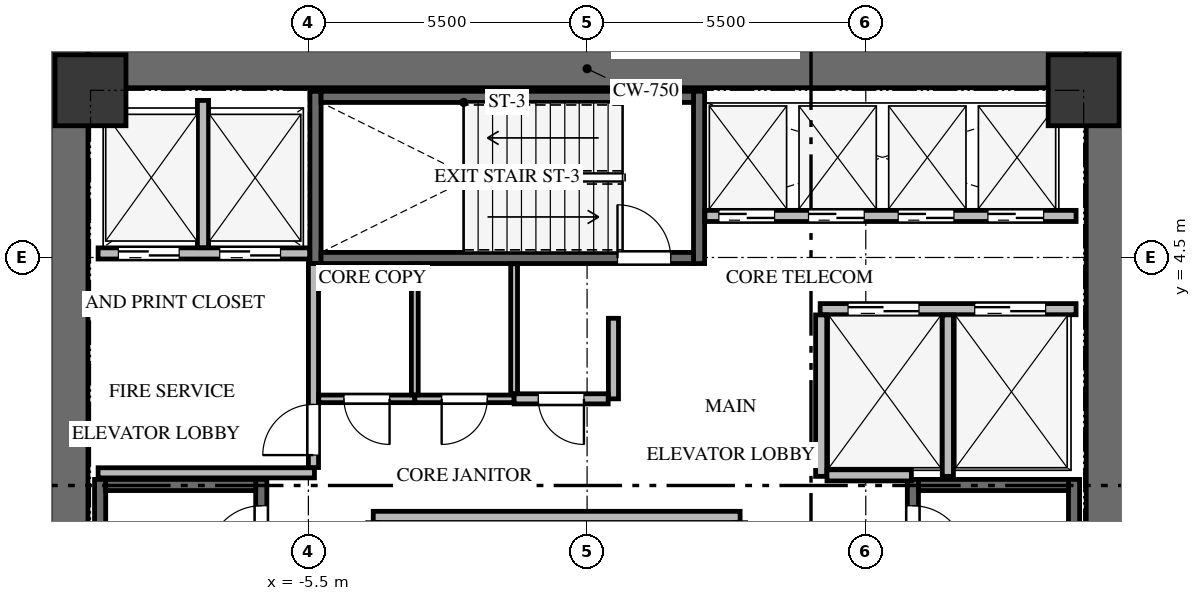
"""IFC4 building model, lengths in metres.
Left out: names, types, materials, properties, quantities, classifications, styles, units other than length and angle.
Written with IfcOpenShell. Run it as: python <this file> out.ifc"""

import sys

from ifc_helpers import new_model, si_unit, direction, frame, frame_2d, origin, origin_2d, place, context, subcontext, project, spatial, rectangle, extrude, source, transform, mapped, element, fill, save


model = new_model("IFC4")
c1 = context("Model", 3, precision=1e-05, world=origin(), true_north=direction((0.0, 1.0)))
c2 = subcontext(c1, "Body", "Model", "MODEL_VIEW")
j1 = project(units=[si_unit("LENGTHUNIT", "METRE"), si_unit("PLANEANGLEUNIT", "RADIAN")], contexts=[c1])
p1 = place(None, origin())
s1 = spatial("IfcSite", under=j1, at=p1, CompositionType="ELEMENT")
p2 = place(p1, origin())
s2 = spatial("IfcBuilding", under=s1, at=p2, CompositionType="ELEMENT")
p3 = place(p2, frame((0.0, 0.0, 93.3)))
s3 = spatial("IfcBuildingStorey", under=s2, at=p3, CompositionType="ELEMENT", Elevation=93.3)
for number, where, z_axis, x_axis in (
    (1, (-10.225, -8.6, 0.0), (0.0, 0.0, 1.0), (0.0, 1.0, 0.0)),
    (2, (10.225, -8.6, 0.0), (0.0, 0.0, 1.0), (0.0, 1.0, 0.0)),
):
    element("IfcWall", number, at=place(p3, frame(where, z_axis=z_axis, x_axis=x_axis)), inside=s3, PredefinedType="SHEAR", context=c2, shape_type="SweptSolid", body=[
        extrude(rectangle(XDim=17.2, YDim=0.75, at=frame_2d((8.6, 0.0))), origin(), (0.0, 0.0, 1.0), 4.2),
    ])
p4 = place(p3, frame((-9.85, 8.225, 0.0), z_axis=(0.0, 0.0, 1.0), x_axis=(1.0, 0.0, 0.0)))
e3 = element("IfcWall", 3, at=p4, inside=s3, PredefinedType="SHEAR", context=c2, shape_type="SweptSolid", body=[
    extrude(rectangle(XDim=19.7, YDim=0.75, at=frame_2d((9.85, 0.0))), origin(), (0.0, 0.0, 1.0), 4.2),
])
p5 = place(p3, frame((-6.43, -7.77, -0.3), z_axis=(0.0, 0.0, 1.0), x_axis=(0.0, 1.0, 0.0)))
e4 = element("IfcWall", 4, at=p5, inside=s3, PredefinedType="SHEAR", context=c2, shape_type="SweptSolid", body=[
    extrude(rectangle(XDim=7.89, YDim=0.22, at=frame_2d((3.945, 0.0))), origin(), (0.0, 0.0, 1.0), 4.26),
])
p6 = place(p5, frame((6.32, 0.0, 0.0)))
e5 = element("IfcOpeningElement", 5, at=p6, cuts=e4, PredefinedType="OPENING", context=c2, shape_type="SweptSolid", body=[
    extrude(rectangle(XDim=1.05, YDim=2.15, at=frame_2d((0.525, 1.075))), frame((0.0, 0.12, 0.0), z_axis=(0.0, -1.0, 0.0), x_axis=(1.0, 0.0, 0.0)), (0.0, 0.0, 1.0), 0.24),
])
p7 = place(p3, frame((-9.61, 0.12, -0.3), z_axis=(0.0, 0.0, 1.0), x_axis=(0.0, -1.0, 0.0)))
e6 = element("IfcWall", 6, at=p7, inside=s3, PredefinedType="SHEAR", context=c2, shape_type="SweptSolid", body=[
    extrude(rectangle(XDim=7.89, YDim=0.22, at=frame_2d((3.945, 0.0))), origin(), (0.0, 0.0, 1.0), 4.26),
])
p8 = place(p3, frame((-6.54, 0.01, -0.3), z_axis=(0.0, 0.0, 1.0), x_axis=(-1.0, 0.0, 0.0)))
e7 = element("IfcWall", 7, at=p8, inside=s3, PredefinedType="SHEAR", context=c2, shape_type="SweptSolid", body=[
    extrude(rectangle(XDim=2.96, YDim=0.22, at=frame_2d((1.48, 0.0))), origin(), (0.0, 0.0, 1.0), 4.26),
])
p9 = place(p3, frame((9.61, -7.77, -0.3), z_axis=(0.0, 0.0, 1.0), x_axis=(0.0, 1.0, 0.0)))
e8 = element("IfcWall", 8, at=p9, inside=s3, PredefinedType="SHEAR", context=c2, shape_type="SweptSolid", body=[
    extrude(rectangle(XDim=7.89, YDim=0.22, at=frame_2d((3.945, 0.0))), origin(), (0.0, 0.0, 1.0), 4.26),
])
p10 = place(p3, frame((6.43, 0.12, -0.3), z_axis=(0.0, 0.0, 1.0), x_axis=(0.0, -1.0, 0.0)))
e9 = element("IfcWall", 9, at=p10, inside=s3, PredefinedType="SHEAR", context=c2, shape_type="SweptSolid", body=[
    extrude(rectangle(XDim=7.89, YDim=0.22, at=frame_2d((3.945, 0.0))), origin(), (0.0, 0.0, 1.0), 4.26),
])
p11 = place(p10, frame((0.52, 0.0, 0.0)))
e10 = element("IfcOpeningElement", 10, at=p11, cuts=e9, PredefinedType="OPENING", context=c2, shape_type="SweptSolid", body=[
    extrude(rectangle(XDim=1.05, YDim=2.15, at=frame_2d((0.525, 1.075))), frame((0.0, 0.12, 0.0), z_axis=(0.0, -1.0, 0.0), x_axis=(1.0, 0.0, 0.0)), (0.0, 0.0, 1.0), 0.24),
])
p12 = place(p3, frame((9.5, 0.01, -0.3), z_axis=(0.0, 0.0, 1.0), x_axis=(-1.0, 0.0, 0.0)))
e11 = element("IfcWall", 11, at=p12, inside=s3, PredefinedType="SHEAR", context=c2, shape_type="SweptSolid", body=[
    extrude(rectangle(XDim=2.96, YDim=0.22, at=frame_2d((1.48, 0.0))), origin(), (0.0, 0.0, 1.0), 4.26),
])
for number, where, z_axis, x_axis in (
    (12, (2.21, 4.38, -0.3), (0.0, 0.0, 1.0), (0.0, 1.0, 0.0)),
    (13, (-5.36, 7.78, -0.3), (0.0, 0.0, 1.0), (0.0, -1.0, 0.0)),
):
    element("IfcWall", number, at=place(p3, frame(where, z_axis=z_axis, x_axis=x_axis)), inside=s3, PredefinedType="SHEAR", context=c2, shape_type="SweptSolid", body=[
        extrude(rectangle(XDim=3.4, YDim=0.22, at=frame_2d((1.7, 0.0))), origin(), (0.0, 0.0, 1.0), 4.26),
    ])
p13 = place(p3, frame((-5.25, 4.49, -0.3), z_axis=(0.0, 0.0, 1.0), x_axis=(1.0, 0.0, 0.0)))
e14 = element("IfcWall", 14, at=p13, inside=s3, PredefinedType="SHEAR", context=c2, shape_type="SweptSolid", body=[
    extrude(rectangle(XDim=7.35, YDim=0.22, at=frame_2d((3.675, 0.0))), origin(), (0.0, 0.0, 1.0), 4.26),
])
p14 = place(p13, frame((5.85, 0.0, 0.0)))
e15 = element("IfcOpeningElement", 15, at=p14, cuts=e14, PredefinedType="OPENING", context=c2, shape_type="SweptSolid", body=[
    extrude(rectangle(XDim=1.05, YDim=2.15, at=frame_2d((0.525, 1.075))), frame((0.0, 0.12, 0.0), z_axis=(0.0, -1.0, 0.0), x_axis=(1.0, 0.0, 0.0)), (0.0, 0.0, 1.0), 0.24),
])
p15 = place(p3, frame((2.1, 7.67, -0.3), z_axis=(0.0, 0.0, 1.0), x_axis=(-1.0, 0.0, 0.0)))
e16 = element("IfcWall", 16, at=p15, inside=s3, PredefinedType="SHEAR", context=c2, shape_type="SweptSolid", body=[
    extrude(rectangle(XDim=7.35, YDim=0.22, at=frame_2d((3.675, 0.0))), origin(), (0.0, 0.0, 1.0), 4.26),
])
m1 = source(origin(), c2, "Body", "SweptSolid", [
    extrude(rectangle(XDim=1.4, YDim=1.4, at=origin_2d()), origin(), (0.0, 0.0, 1.0), 4.26),
])
for number, where, z_axis, x_axis in (
    (17, (9.8, 7.8, -0.3), (0.0, 0.0, 1.0), (1.0, 0.0, 0.0)),
    (18, (-9.8, 7.8, -0.3), (0.0, 0.0, 1.0), (1.0, 0.0, 0.0)),
):
    element("IfcColumn", number, at=place(p3, frame(where, z_axis=z_axis, x_axis=x_axis)), inside=s3, PredefinedType="COLUMN", context=c2, shape_type="MappedRepresentation", body=[
        mapped(m1, transform((0.0, 0.0, 0.0), x_axis=(1.0, 0.0, 0.0), y_axis=(0.0, 1.0, 0.0), z_axis=(0.0, 0.0, 1.0), scale=1.0)),
    ])
p16 = place(p3, frame((-9.65, 4.58, 0.0), z_axis=(0.0, 0.0, 1.0), x_axis=(1.0, 0.0, 0.0)))
e19 = element("IfcWall", 19, at=p16, inside=s3, PredefinedType="SOLIDWALL", context=c2, shape_type="SweptSolid", body=[
    extrude(rectangle(XDim=4.175, YDim=0.22, at=frame_2d((2.087, 0.0))), origin(), (0.0, 0.0, 1.0), 3.945),
])
p17 = place(p16, frame((0.4, 0.0, 0.0)))
e20 = element("IfcOpeningElement", 20, at=p17, cuts=e19, PredefinedType="OPENING", context=c2, shape_type="SweptSolid", body=[
    extrude(rectangle(XDim=1.2, YDim=2.15, at=frame_2d((0.6, 1.075))), frame((0.0, 0.12, 0.0), z_axis=(0.0, -1.0, 0.0), x_axis=(1.0, 0.0, 0.0)), (0.0, 0.0, 1.0), 0.24),
])
p18 = place(p16, frame((2.4, 0.0, 0.0)))
e21 = element("IfcOpeningElement", 21, at=p18, cuts=e19, PredefinedType="OPENING", context=c2, shape_type="SweptSolid", body=[
    extrude(rectangle(XDim=1.2, YDim=2.15, at=frame_2d((0.6, 1.075))), frame((0.0, 0.12, 0.0), z_axis=(0.0, -1.0, 0.0), x_axis=(1.0, 0.0, 0.0)), (0.0, 0.0, 1.0), 0.24),
])
p19 = place(p3, frame((-7.58, 4.694, 0.0), z_axis=(0.0, 0.0, 1.0), x_axis=(0.0, 1.0, 0.0)))
e22 = element("IfcWall", 22, at=p19, inside=s3, PredefinedType="SOLIDWALL", context=c2, shape_type="SweptSolid", body=[
    extrude(rectangle(XDim=2.906, YDim=0.22, at=frame_2d((1.453, 0.0))), origin(), (0.0, 0.0, 1.0), 3.945),
])
p20 = place(p3, frame((-9.65, 0.25, 0.0), z_axis=(0.0, 0.0, 1.0), x_axis=(1.0, 0.0, 0.0)))
e23 = element("IfcWall", 23, at=p20, inside=s3, PredefinedType="SOLIDWALL", context=c2, shape_type="SweptSolid", body=[
    extrude(rectangle(XDim=4.27, YDim=0.2, at=frame_2d((2.135, 0.0))), origin(), (0.0, 0.0, 1.0), 3.945),
])
p21 = place(p3, frame((-5.4, 0.354, 0.0), z_axis=(0.0, 0.0, 1.0), x_axis=(0.0, 1.0, 0.0)))
e24 = element("IfcWall", 24, at=p21, inside=s3, PredefinedType="SOLIDWALL", context=c2, shape_type="SweptSolid", body=[
    extrude(rectangle(XDim=4.026, YDim=0.2, at=frame_2d((2.013, 0.0))), origin(), (0.0, 0.0, 1.0), 3.945),
])
p22 = place(p21, frame((0.246, 0.0, 0.0)))
e25 = element("IfcOpeningElement", 25, at=p22, cuts=e24, PredefinedType="OPENING", context=c2, shape_type="SweptSolid", body=[
    extrude(rectangle(XDim=1.0, YDim=2.15, at=frame_2d((0.5, 1.075))), frame((0.0, 0.11, 0.0), z_axis=(0.0, -1.0, 0.0), x_axis=(1.0, 0.0, 0.0)), (0.0, 0.0, 1.0), 0.22),
])
p23 = place(p3, frame((4.6, 3.48, 0.0), z_axis=(0.0, 0.0, 1.0), x_axis=(1.0, 0.0, 0.0)))
e26 = element("IfcWall", 26, at=p23, inside=s3, PredefinedType="SOLIDWALL", context=c2, shape_type="SweptSolid", body=[
    extrude(rectangle(XDim=5.05, YDim=0.22, at=frame_2d((2.525, 0.0))), origin(), (0.0, 0.0, 1.0), 3.945),
])
p24 = place(p23, frame((0.55, 0.0, 0.0)))
e27 = element("IfcOpeningElement", 27, at=p24, cuts=e26, PredefinedType="OPENING", context=c2, shape_type="SweptSolid", body=[
    extrude(rectangle(XDim=1.4, YDim=2.15, at=frame_2d((0.7, 1.075))), frame((0.0, 0.12, 0.0), z_axis=(0.0, -1.0, 0.0), x_axis=(1.0, 0.0, 0.0)), (0.0, 0.0, 1.0), 0.24),
])
p25 = place(p23, frame((3.05, 0.0, 0.0)))
e28 = element("IfcOpeningElement", 28, at=p25, cuts=e26, PredefinedType="OPENING", context=c2, shape_type="SweptSolid", body=[
    extrude(rectangle(XDim=1.4, YDim=2.15, at=frame_2d((0.7, 1.075))), frame((0.0, 0.12, 0.0), z_axis=(0.0, -1.0, 0.0), x_axis=(1.0, 0.0, 0.0)), (0.0, 0.0, 1.0), 0.24),
])
for number, where, z_axis, x_axis in (
    (29, (4.62, 0.18, 0.0), (0.0, 0.0, 1.0), (0.0, 1.0, 0.0)),
    (30, (7.12, 0.18, 0.0), (0.0, 0.0, 1.0), (0.0, 1.0, 0.0)),
):
    element("IfcWall", number, at=place(p3, frame(where, z_axis=z_axis, x_axis=x_axis)), inside=s3, PredefinedType="SOLIDWALL", context=c2, shape_type="SweptSolid", body=[
        extrude(rectangle(XDim=3.186, YDim=0.22, at=frame_2d((1.593, 0.0))), origin(), (0.0, 0.0, 1.0), 3.945),
    ])
p26 = place(p3, frame((4.734, 0.2, 0.0), z_axis=(0.0, 0.0, 1.0), x_axis=(1.0, 0.0, 0.0)))
e31 = element("IfcWall", 31, at=p26, inside=s3, PredefinedType="SOLIDWALL", context=c2, shape_type="SweptSolid", body=[
    extrude(rectangle(XDim=1.666, YDim=0.22, at=frame_2d((0.833, 0.0))), origin(), (0.0, 0.0, 1.0), 3.945),
])
p27 = place(p3, frame((-4.22, -0.62, 0.0), z_axis=(0.0, 0.0, 1.0), x_axis=(1.0, 0.0, 0.0)))
e32 = element("IfcWall", 32, at=p27, inside=s3, PredefinedType="SOLIDWALL", context=c2, shape_type="SweptSolid", body=[
    extrude(rectangle(XDim=7.24, YDim=0.22, at=frame_2d((3.62, 0.0))), origin(), (0.0, 0.0, 1.0), 3.945),
])
p28 = place(p3, frame((2.325, 5.32, 0.0), z_axis=(0.0, 0.0, 1.0), x_axis=(1.0, 0.0, 0.0)))
e33 = element("IfcWall", 33, at=p28, inside=s3, PredefinedType="SOLIDWALL", context=c2, shape_type="SweptSolid", body=[
    extrude(rectangle(XDim=7.325, YDim=0.22, at=frame_2d((3.663, 0.0))), origin(), (0.0, 0.0, 1.0), 3.945),
])
p29 = place(p28, frame((0.275, 0.0, 0.0)))
e34 = element("IfcOpeningElement", 34, at=p29, cuts=e33, PredefinedType="OPENING", context=c2, shape_type="SweptSolid", body=[
    extrude(rectangle(XDim=1.1, YDim=2.15, at=frame_2d((0.55, 1.075))), frame((0.0, 0.12, 0.0), z_axis=(0.0, -1.0, 0.0), x_axis=(1.0, 0.0, 0.0)), (0.0, 0.0, 1.0), 0.24),
])
p30 = place(p28, frame((2.045, 0.0, 0.0)))
e35 = element("IfcOpeningElement", 35, at=p30, cuts=e33, PredefinedType="OPENING", context=c2, shape_type="SweptSolid", body=[
    extrude(rectangle(XDim=1.1, YDim=2.15, at=frame_2d((0.55, 1.075))), frame((0.0, 0.12, 0.0), z_axis=(0.0, -1.0, 0.0), x_axis=(1.0, 0.0, 0.0)), (0.0, 0.0, 1.0), 0.24),
])
p31 = place(p28, frame((3.815, 0.0, 0.0)))
e36 = element("IfcOpeningElement", 36, at=p31, cuts=e33, PredefinedType="OPENING", context=c2, shape_type="SweptSolid", body=[
    extrude(rectangle(XDim=1.1, YDim=2.15, at=frame_2d((0.55, 1.075))), frame((0.0, 0.12, 0.0), z_axis=(0.0, -1.0, 0.0), x_axis=(1.0, 0.0, 0.0)), (0.0, 0.0, 1.0), 0.24),
])
p32 = place(p28, frame((5.585, 0.0, 0.0)))
e37 = element("IfcOpeningElement", 37, at=p32, cuts=e33, PredefinedType="OPENING", context=c2, shape_type="SweptSolid", body=[
    extrude(rectangle(XDim=1.1, YDim=2.15, at=frame_2d((0.55, 1.075))), frame((0.0, 0.12, 0.0), z_axis=(0.0, -1.0, 0.0), x_axis=(1.0, 0.0, 0.0)), (0.0, 0.0, 1.0), 0.24),
])
p33 = place(p3, frame((-3.4, 1.71, 0.0), z_axis=(0.0, 0.0, 1.0), x_axis=(-1.0, 0.0, 0.0)))
e38 = element("IfcWall", 38, at=p33, inside=s3, PredefinedType="PARTITIONING", context=c2, shape_type="SweptSolid", body=[
    extrude(rectangle(XDim=1.896, YDim=0.15, at=frame_2d((0.948, 0.0))), origin(), (0.0, 0.0, 1.0), 3.945),
])
p34 = place(p33, frame((0.498, 0.0, 0.0)))
e39 = element("IfcOpeningElement", 39, at=p34, cuts=e38, PredefinedType="OPENING", context=c2, shape_type="SweptSolid", body=[
    extrude(rectangle(XDim=0.9, YDim=2.05, at=frame_2d((0.45, 1.025))), frame((0.0, 0.085, 0.0), z_axis=(0.0, -1.0, 0.0), x_axis=(1.0, 0.0, 0.0)), (0.0, 0.0, 1.0), 0.17),
])
p35 = place(p3, frame((-1.44, 1.71, 0.0), z_axis=(0.0, 0.0, 1.0), x_axis=(-1.0, 0.0, 0.0)))
e40 = element("IfcWall", 40, at=p35, inside=s3, PredefinedType="PARTITIONING", context=c2, shape_type="SweptSolid", body=[
    extrude(rectangle(XDim=1.96, YDim=0.15, at=frame_2d((0.98, 0.0))), origin(), (0.0, 0.0, 1.0), 3.945),
])
p36 = place(p35, frame((0.53, 0.0, 0.0)))
e41 = element("IfcOpeningElement", 41, at=p36, cuts=e40, PredefinedType="OPENING", context=c2, shape_type="SweptSolid", body=[
    extrude(rectangle(XDim=0.9, YDim=2.05, at=frame_2d((0.45, 1.025))), frame((0.0, 0.085, 0.0), z_axis=(0.0, -1.0, 0.0), x_axis=(1.0, 0.0, 0.0)), (0.0, 0.0, 1.0), 0.17),
])
p37 = place(p3, frame((0.52, 3.3, 0.0), z_axis=(0.0, 0.0, 1.0), x_axis=(0.0, -1.0, 0.0)))
e42 = element("IfcWall", 42, at=p37, inside=s3, PredefinedType="SOLIDWALL", context=c2, shape_type="SweptSolid", body=[
    extrude(rectangle(XDim=1.59, YDim=0.2, at=frame_2d((0.795, 0.0))), origin(), (0.0, 0.0, 1.0), 3.945),
])
p38 = place(p3, frame((0.416, 1.71, 0.0), z_axis=(0.0, 0.0, 1.0), x_axis=(-1.0, 0.0, 0.0)))
e43 = element("IfcWall", 43, at=p38, inside=s3, PredefinedType="SOLIDWALL", context=c2, shape_type="SweptSolid", body=[
    extrude(rectangle(XDim=1.856, YDim=0.2, at=frame_2d((0.928, 0.0))), origin(), (0.0, 0.0, 1.0), 3.945),
])
p39 = place(p38, frame((0.478, 0.0, 0.0)))
e44 = element("IfcOpeningElement", 44, at=p39, cuts=e43, PredefinedType="OPENING", context=c2, shape_type="SweptSolid", body=[
    extrude(rectangle(XDim=0.9, YDim=2.05, at=frame_2d((0.45, 1.025))), frame((0.0, 0.11, 0.0), z_axis=(0.0, -1.0, 0.0), x_axis=(1.0, 0.0, 0.0)), (0.0, 0.0, 1.0), 0.22),
])
p40 = place(p3, frame((-3.4, 4.375, 0.0), z_axis=(0.0, 0.0, 1.0), x_axis=(0.0, -1.0, 0.0)))
e45 = element("IfcWall", 45, at=p40, inside=s3, PredefinedType="PARTITIONING", context=c2, shape_type="SweptSolid", body=[
    extrude(rectangle(XDim=2.586, YDim=0.135, at=frame_2d((1.293, 0.0))), origin(), (0.0, 0.0, 1.0), 3.945),
])
p41 = place(p3, frame((-1.44, 4.375, 0.0), z_axis=(0.0, 0.0, 1.0), x_axis=(0.0, -1.0, 0.0)))
e46 = element("IfcWall", 46, at=p41, inside=s3, PredefinedType="PARTITIONING", context=c2, shape_type="SweptSolid", body=[
    extrude(rectangle(XDim=2.561, YDim=0.135, at=frame_2d((1.281, 0.0))), origin(), (0.0, 0.0, 1.0), 3.945),
])
m2 = source(origin(), c2, "Body", "SweptSolid", [
    extrude(rectangle(XDim=1.05, YDim=2.15, at=frame_2d((0.525, 1.075))), frame((0.0, 0.025, 0.0), z_axis=(0.0, -1.0, 0.0), x_axis=(1.0, 0.0, 0.0)), (0.0, 0.0, 1.0), 0.05),
])
p42 = place(p6, origin())
e47 = element("IfcDoor", 47, at=p42, inside=s3, OperationType="SINGLE_SWING_LEFT", PredefinedType="DOOR", context=c2, shape_type="MappedRepresentation", body=[
    mapped(m2, transform((0.0, 0.0, 0.0), x_axis=(1.0, 0.0, 0.0), y_axis=(0.0, 1.0, 0.0), z_axis=(0.0, 0.0, 1.0), scale=1.0)),
])
fill(e5, e47)
m3 = source(origin(), c2, "Body", "SweptSolid", [
    extrude(rectangle(XDim=1.05, YDim=2.15, at=frame_2d((0.525, 1.075))), frame((0.0, 0.025, 0.0), z_axis=(0.0, -1.0, 0.0), x_axis=(1.0, 0.0, 0.0)), (0.0, 0.0, 1.0), 0.05),
])
p43 = place(p11, origin())
e48 = element("IfcDoor", 48, at=p43, inside=s3, OperationType="SINGLE_SWING_RIGHT", PredefinedType="DOOR", context=c2, shape_type="MappedRepresentation", body=[
    mapped(m3, transform((0.0, 0.0, 0.0), x_axis=(1.0, 0.0, 0.0), y_axis=(0.0, 1.0, 0.0), z_axis=(0.0, 0.0, 1.0), scale=1.0)),
])
fill(e10, e48)
p44 = place(p14, origin())
e49 = element("IfcDoor", 49, at=p44, inside=s3, OperationType="SINGLE_SWING_LEFT", PredefinedType="DOOR", context=c2, shape_type="MappedRepresentation", body=[
    mapped(m2, transform((0.0, 0.0, 0.0), x_axis=(1.0, 0.0, 0.0), y_axis=(0.0, 1.0, 0.0), z_axis=(0.0, 0.0, 1.0), scale=1.0)),
])
fill(e15, e49)
m4 = source(origin(), c2, "Body", "SweptSolid", [
    extrude(rectangle(XDim=1.2, YDim=2.15, at=frame_2d((0.6, 1.075))), frame((0.0, 0.025, 0.0), z_axis=(0.0, -1.0, 0.0), x_axis=(1.0, 0.0, 0.0)), (0.0, 0.0, 1.0), 0.05),
])
p45 = place(p17, origin())
e50 = element("IfcDoor", 50, at=p45, inside=s3, OperationType="DOUBLE_DOOR_SLIDING", PredefinedType="DOOR", context=c2, shape_type="MappedRepresentation", body=[
    mapped(m4, transform((0.0, 0.0, 0.0), x_axis=(1.0, 0.0, 0.0), y_axis=(0.0, 1.0, 0.0), z_axis=(0.0, 0.0, 1.0), scale=1.0)),
])
fill(e20, e50)
p46 = place(p18, origin())
e51 = element("IfcDoor", 51, at=p46, inside=s3, OperationType="DOUBLE_DOOR_SLIDING", PredefinedType="DOOR", context=c2, shape_type="MappedRepresentation", body=[
    mapped(m4, transform((0.0, 0.0, 0.0), x_axis=(1.0, 0.0, 0.0), y_axis=(0.0, 1.0, 0.0), z_axis=(0.0, 0.0, 1.0), scale=1.0)),
])
fill(e21, e51)
m5 = source(origin(), c2, "Body", "SweptSolid", [
    extrude(rectangle(XDim=1.0, YDim=2.15, at=frame_2d((0.5, 1.075))), frame((0.0, 0.025, 0.0), z_axis=(0.0, -1.0, 0.0), x_axis=(1.0, 0.0, 0.0)), (0.0, 0.0, 1.0), 0.05),
])
p47 = place(p22, origin())
e52 = element("IfcDoor", 52, at=p47, inside=s3, OperationType="SINGLE_SWING_LEFT", PredefinedType="DOOR", context=c2, shape_type="MappedRepresentation", body=[
    mapped(m5, transform((0.0, 0.0, 0.0), x_axis=(1.0, 0.0, 0.0), y_axis=(0.0, 1.0, 0.0), z_axis=(0.0, 0.0, 1.0), scale=1.0)),
])
fill(e25, e52)
m6 = source(origin(), c2, "Body", "SweptSolid", [
    extrude(rectangle(XDim=1.4, YDim=2.15, at=frame_2d((0.7, 1.075))), frame((0.0, 0.025, 0.0), z_axis=(0.0, -1.0, 0.0), x_axis=(1.0, 0.0, 0.0)), (0.0, 0.0, 1.0), 0.05),
])
p48 = place(p24, origin())
e53 = element("IfcDoor", 53, at=p48, inside=s3, OperationType="DOUBLE_DOOR_SLIDING", PredefinedType="DOOR", context=c2, shape_type="MappedRepresentation", body=[
    mapped(m6, transform((0.0, 0.0, 0.0), x_axis=(1.0, 0.0, 0.0), y_axis=(0.0, 1.0, 0.0), z_axis=(0.0, 0.0, 1.0), scale=1.0)),
])
fill(e27, e53)
p49 = place(p25, origin())
e54 = element("IfcDoor", 54, at=p49, inside=s3, OperationType="DOUBLE_DOOR_SLIDING", PredefinedType="DOOR", context=c2, shape_type="MappedRepresentation", body=[
    mapped(m6, transform((0.0, 0.0, 0.0), x_axis=(1.0, 0.0, 0.0), y_axis=(0.0, 1.0, 0.0), z_axis=(0.0, 0.0, 1.0), scale=1.0)),
])
fill(e28, e54)
m7 = source(origin(), c2, "Body", "SweptSolid", [
    extrude(rectangle(XDim=1.1, YDim=2.15, at=frame_2d((0.55, 1.075))), frame((0.0, 0.025, 0.0), z_axis=(0.0, -1.0, 0.0), x_axis=(1.0, 0.0, 0.0)), (0.0, 0.0, 1.0), 0.05),
])
p50 = place(p29, origin())
e55 = element("IfcDoor", 55, at=p50, inside=s3, OperationType="DOUBLE_DOOR_SLIDING", PredefinedType="DOOR", context=c2, shape_type="MappedRepresentation", body=[
    mapped(m7, transform((0.0, 0.0, 0.0), x_axis=(1.0, 0.0, 0.0), y_axis=(0.0, 1.0, 0.0), z_axis=(0.0, 0.0, 1.0), scale=1.0)),
])
fill(e34, e55)
p51 = place(p30, origin())
e56 = element("IfcDoor", 56, at=p51, inside=s3, OperationType="DOUBLE_DOOR_SLIDING", PredefinedType="DOOR", context=c2, shape_type="MappedRepresentation", body=[
    mapped(m7, transform((0.0, 0.0, 0.0), x_axis=(1.0, 0.0, 0.0), y_axis=(0.0, 1.0, 0.0), z_axis=(0.0, 0.0, 1.0), scale=1.0)),
])
fill(e35, e56)
p52 = place(p31, origin())
e57 = element("IfcDoor", 57, at=p52, inside=s3, OperationType="DOUBLE_DOOR_SLIDING", PredefinedType="DOOR", context=c2, shape_type="MappedRepresentation", body=[
    mapped(m7, transform((0.0, 0.0, 0.0), x_axis=(1.0, 0.0, 0.0), y_axis=(0.0, 1.0, 0.0), z_axis=(0.0, 0.0, 1.0), scale=1.0)),
])
fill(e36, e57)
p53 = place(p32, origin())
e58 = element("IfcDoor", 58, at=p53, inside=s3, OperationType="DOUBLE_DOOR_SLIDING", PredefinedType="DOOR", context=c2, shape_type="MappedRepresentation", body=[
    mapped(m7, transform((0.0, 0.0, 0.0), x_axis=(1.0, 0.0, 0.0), y_axis=(0.0, 1.0, 0.0), z_axis=(0.0, 0.0, 1.0), scale=1.0)),
])
fill(e37, e58)
m8 = source(origin(), c2, "Body", "SweptSolid", [
    extrude(rectangle(XDim=0.9, YDim=2.05, at=frame_2d((0.45, 1.025))), frame((0.0, 0.025, 0.0), z_axis=(0.0, -1.0, 0.0), x_axis=(1.0, 0.0, 0.0)), (0.0, 0.0, 1.0), 0.05),
])
p54 = place(p34, origin())
e59 = element("IfcDoor", 59, at=p54, inside=s3, OperationType="SINGLE_SWING_LEFT", PredefinedType="DOOR", context=c2, shape_type="MappedRepresentation", body=[
    mapped(m8, transform((0.0, 0.0, 0.0), x_axis=(1.0, 0.0, 0.0), y_axis=(0.0, 1.0, 0.0), z_axis=(0.0, 0.0, 1.0), scale=1.0)),
])
fill(e39, e59)
m9 = source(origin(), c2, "Body", "SweptSolid", [
    extrude(rectangle(XDim=0.9, YDim=2.05, at=frame_2d((0.45, 1.025))), frame((0.0, 0.025, 0.0), z_axis=(0.0, -1.0, 0.0), x_axis=(1.0, 0.0, 0.0)), (0.0, 0.0, 1.0), 0.05),
])
p55 = place(p36, origin())
e60 = element("IfcDoor", 60, at=p55, inside=s3, OperationType="SINGLE_SWING_RIGHT", PredefinedType="DOOR", context=c2, shape_type="MappedRepresentation", body=[
    mapped(m9, transform((0.0, 0.0, 0.0), x_axis=(1.0, 0.0, 0.0), y_axis=(0.0, 1.0, 0.0), z_axis=(0.0, 0.0, 1.0), scale=1.0)),
])
fill(e41, e60)
p56 = place(p39, origin())
e61 = element("IfcDoor", 61, at=p56, inside=s3, OperationType="SINGLE_SWING_LEFT", PredefinedType="DOOR", context=c2, shape_type="MappedRepresentation", body=[
    mapped(m8, transform((0.0, 0.0, 0.0), x_axis=(1.0, 0.0, 0.0), y_axis=(0.0, 1.0, 0.0), z_axis=(0.0, 0.0, 1.0), scale=1.0)),
])
fill(e44, e61)
save(model, sys.argv[1])
